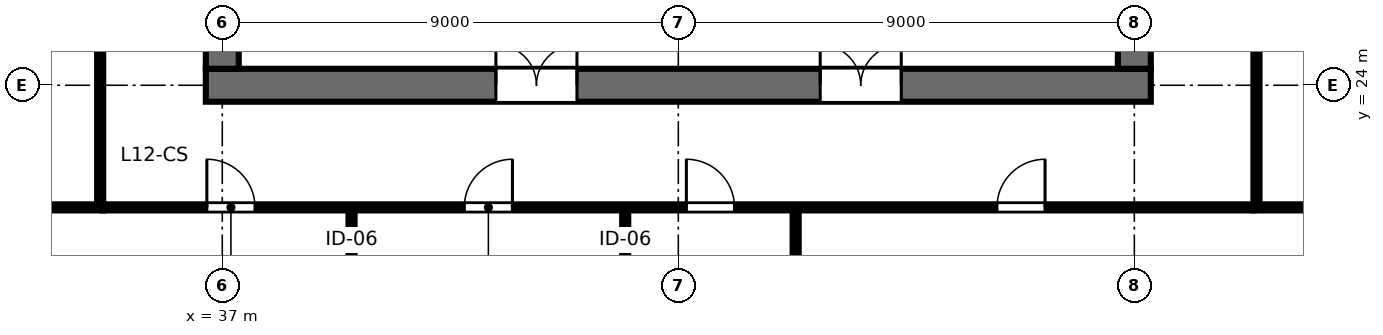
"""IFC4 building model, lengths in metres.
Left out: names, types, materials, properties, quantities, classifications, styles, units other than length and angle.
Written with IfcOpenShell. Run it as: python <this file> out.ifc"""

import sys

from ifc_helpers import new_model, si_unit, direction, frame, frame_2d, origin, place, context, subcontext, project, spatial, rectangle, extrude, element, fill, save


model = new_model("IFC4")
c1 = context("Model", 3, precision=1e-05, world=origin(), true_north=direction((0.0, 1.0)))
c2 = subcontext(c1, "Body", "Model", "MODEL_VIEW")
j1 = project(units=[si_unit("LENGTHUNIT", "METRE"), si_unit("PLANEANGLEUNIT", "RADIAN")], contexts=[c1])
p1 = place(None, origin())
s1 = spatial("IfcSite", under=j1, at=p1, CompositionType="ELEMENT")
p2 = place(p1, origin())
s2 = spatial("IfcBuilding", under=s1, at=p2, CompositionType="ELEMENT")
p3 = place(p2, frame((0.0, 0.0, 49.6)))
s3 = spatial("IfcBuildingStorey", under=s2, at=p3, CompositionType="ELEMENT", Elevation=49.6)
p4 = place(p3, frame((36.675, 24.0, 0.0), z_axis=(0.0, 0.0, 1.0), x_axis=(1.0, 0.0, 0.0)))
e1 = element("IfcWall", 1, at=p4, inside=s3, PredefinedType="SHEAR", context=c2, shape_type="SweptSolid", body=[
    extrude(rectangle(XDim=18.65, YDim=0.65, at=frame_2d((9.325, 0.0))), origin(), (0.0, 0.0, 1.0), 3.36),
])
p5 = place(p4, frame((5.725, 0.0, 0.0)))
e2 = element("IfcOpeningElement", 2, at=p5, cuts=e1, PredefinedType="OPENING", context=c2, shape_type="SweptSolid", body=[
    extrude(rectangle(XDim=1.6, YDim=2.15, at=frame_2d((0.8, 1.075))), frame((0.0, 0.335, 0.0), z_axis=(0.0, -1.0, 0.0), x_axis=(1.0, 0.0, 0.0)), (0.0, 0.0, 1.0), 0.67),
])
p6 = place(p4, frame((12.125, 0.0, 0.0)))
e3 = element("IfcOpeningElement", 3, at=p6, cuts=e1, PredefinedType="OPENING", context=c2, shape_type="SweptSolid", body=[
    extrude(rectangle(XDim=1.6, YDim=2.15, at=frame_2d((0.8, 1.075))), frame((0.0, 0.335, 0.0), z_axis=(0.0, -1.0, 0.0), x_axis=(1.0, 0.0, 0.0)), (0.0, 0.0, 1.0), 0.67),
])
p7 = place(p3, frame((37.0, 24.325, 0.0), z_axis=(0.0, 0.0, 1.0), x_axis=(0.0, 1.0, 0.0)))
e4 = element("IfcWall", 4, at=p7, inside=s3, PredefinedType="SHEAR", context=c2, shape_type="SweptSolid", body=[
    extrude(rectangle(XDim=15.35, YDim=0.65, at=frame_2d((7.675, 0.0))), origin(), (0.0, 0.0, 1.0), 3.36),
])
p8 = place(p7, frame((5.2, 0.0, 0.0)))
e5 = element("IfcOpeningElement", 5, at=p8, cuts=e4, PredefinedType="OPENING", context=c2, shape_type="SweptSolid", body=[
    extrude(rectangle(XDim=1.15, YDim=2.15, at=frame_2d((0.575, 1.075))), frame((0.0, 0.335, 0.0), z_axis=(0.0, -1.0, 0.0), x_axis=(1.0, 0.0, 0.0)), (0.0, 0.0, 1.0), 0.67),
])
p9 = place(p3, frame((55.0, 24.325, 0.0), z_axis=(0.0, 0.0, 1.0), x_axis=(0.0, 1.0, 0.0)))
e6 = element("IfcWall", 6, at=p9, inside=s3, PredefinedType="SHEAR", context=c2, shape_type="SweptSolid", body=[
    extrude(rectangle(XDim=15.35, YDim=0.65, at=frame_2d((7.675, 0.0))), origin(), (0.0, 0.0, 1.0), 3.36),
])
p10 = place(p9, frame((5.2, 0.0, 0.0)))
e7 = element("IfcOpeningElement", 7, at=p10, cuts=e6, PredefinedType="OPENING", context=c2, shape_type="SweptSolid", body=[
    extrude(rectangle(XDim=1.15, YDim=2.15, at=frame_2d((0.575, 1.075))), frame((0.0, 0.335, 0.0), z_axis=(0.0, -1.0, 0.0), x_axis=(1.0, 0.0, 0.0)), (0.0, 0.0, 1.0), 0.67),
])
p11 = place(p3, frame((39.551, 21.59, 0.0), z_axis=(0.0, 0.0, 1.0), x_axis=(0.0, -1.0, 0.0)))
e8 = element("IfcWall", 8, at=p11, inside=s3, PredefinedType="PARTITIONING", context=c2, shape_type="SweptSolid", body=[
    extrude(rectangle(XDim=10.81, YDim=0.12, at=frame_2d((5.405, 0.0))), origin(), (0.0, 0.0, 1.0), 2.64),
])
p12 = place(p11, frame((1.4, 0.0, 0.0)))
e9 = element("IfcOpeningElement", 9, at=p12, cuts=e8, PredefinedType="OPENING", context=c2, shape_type="SweptSolid", body=[
    extrude(rectangle(XDim=0.9, YDim=2.15, at=frame_2d((0.45, 1.075))), frame((0.0, 0.07, 0.0), z_axis=(0.0, -1.0, 0.0), x_axis=(1.0, 0.0, 0.0)), (0.0, 0.0, 1.0), 0.14),
])
p13 = place(p3, frame((44.952, 21.59, 0.0), z_axis=(0.0, 0.0, 1.0), x_axis=(0.0, -1.0, 0.0)))
e10 = element("IfcWall", 10, at=p13, inside=s3, PredefinedType="PARTITIONING", context=c2, shape_type="SweptSolid", body=[
    extrude(rectangle(XDim=10.81, YDim=0.12, at=frame_2d((5.405, 0.0))), origin(), (0.0, 0.0, 1.0), 2.64),
])
p14 = place(p13, frame((1.4, 0.0, 0.0)))
e11 = element("IfcOpeningElement", 11, at=p14, cuts=e10, PredefinedType="OPENING", context=c2, shape_type="SweptSolid", body=[
    extrude(rectangle(XDim=0.9, YDim=2.15, at=frame_2d((0.45, 1.075))), frame((0.0, 0.07, 0.0), z_axis=(0.0, -1.0, 0.0), x_axis=(1.0, 0.0, 0.0)), (0.0, 0.0, 1.0), 0.14),
])
p15 = place(p3, frame((48.316, 21.59, 0.0), z_axis=(0.0, 0.0, 1.0), x_axis=(0.0, -1.0, 0.0)))
e12 = element("IfcWall", 12, at=p15, inside=s3, PredefinedType="PARTITIONING", context=c2, shape_type="SweptSolid", body=[
    extrude(rectangle(XDim=10.81, YDim=0.12, at=frame_2d((5.405, 0.0))), origin(), (0.0, 0.0, 1.0), 2.64),
])
p16 = place(p15, frame((1.4, 0.0, 0.0)))
e13 = element("IfcOpeningElement", 13, at=p16, cuts=e12, PredefinedType="OPENING", context=c2, shape_type="SweptSolid", body=[
    extrude(rectangle(XDim=0.9, YDim=2.15, at=frame_2d((0.45, 1.075))), frame((0.0, 0.07, 0.0), z_axis=(0.0, -1.0, 0.0), x_axis=(1.0, 0.0, 0.0)), (0.0, 0.0, 1.0), 0.14),
])
p17 = place(p3, frame((34.65, 21.59, 0.0), z_axis=(0.0, 0.0, 1.0), x_axis=(1.0, 0.0, 0.0)))
e14 = element("IfcWall", 14, at=p17, inside=s3, PredefinedType="PARTITIONING", context=c2, shape_type="SweptSolid", body=[
    extrude(rectangle(XDim=22.7, YDim=0.12, at=frame_2d((11.35, 0.0))), origin(), (0.0, 0.0, 1.0), 2.64),
])
p18 = place(p17, frame((2.045, 0.0, 0.0)))
e15 = element("IfcOpeningElement", 15, at=p18, cuts=e14, PredefinedType="OPENING", context=c2, shape_type="SweptSolid", body=[
    extrude(rectangle(XDim=0.95, YDim=2.15, at=frame_2d((0.475, 1.075))), frame((0.0, 0.07, 0.0), z_axis=(0.0, -1.0, 0.0), x_axis=(1.0, 0.0, 0.0)), (0.0, 0.0, 1.0), 0.14),
])
p19 = place(p17, frame((7.126, 0.0, 0.0)))
e16 = element("IfcOpeningElement", 16, at=p19, cuts=e14, PredefinedType="OPENING", context=c2, shape_type="SweptSolid", body=[
    extrude(rectangle(XDim=0.95, YDim=2.15, at=frame_2d((0.475, 1.075))), frame((0.0, 0.07, 0.0), z_axis=(0.0, -1.0, 0.0), x_axis=(1.0, 0.0, 0.0)), (0.0, 0.0, 1.0), 0.14),
])
p20 = place(p17, frame((11.509, 0.0, 0.0)))
e17 = element("IfcOpeningElement", 17, at=p20, cuts=e14, PredefinedType="OPENING", context=c2, shape_type="SweptSolid", body=[
    extrude(rectangle(XDim=0.95, YDim=2.15, at=frame_2d((0.475, 1.075))), frame((0.0, 0.07, 0.0), z_axis=(0.0, -1.0, 0.0), x_axis=(1.0, 0.0, 0.0)), (0.0, 0.0, 1.0), 0.14),
])
p21 = place(p17, frame((17.638, 0.0, 0.0)))
e18 = element("IfcOpeningElement", 18, at=p21, cuts=e14, PredefinedType="OPENING", context=c2, shape_type="SweptSolid", body=[
    extrude(rectangle(XDim=0.95, YDim=2.15, at=frame_2d((0.475, 1.075))), frame((0.0, 0.07, 0.0), z_axis=(0.0, -1.0, 0.0), x_axis=(1.0, 0.0, 0.0)), (0.0, 0.0, 1.0), 0.14),
])
p22 = place(p3, frame((34.59, 21.65, 0.0), z_axis=(0.0, 0.0, 1.0), x_axis=(0.0, 1.0, 0.0)))
e19 = element("IfcWall", 19, at=p22, inside=s3, PredefinedType="PARTITIONING", context=c2, shape_type="SweptSolid", body=[
    extrude(rectangle(XDim=20.7, YDim=0.12, at=frame_2d((10.35, 0.0))), origin(), (0.0, 0.0, 1.0), 2.64),
])
p23 = place(p22, frame((9.875, 0.0, 0.0)))
e20 = element("IfcOpeningElement", 20, at=p23, cuts=e19, PredefinedType="OPENING", context=c2, shape_type="SweptSolid", body=[
    extrude(rectangle(XDim=0.95, YDim=2.15, at=frame_2d((0.475, 1.075))), frame((0.0, 0.07, 0.0), z_axis=(0.0, -1.0, 0.0), x_axis=(1.0, 0.0, 0.0)), (0.0, 0.0, 1.0), 0.14),
])
p24 = place(p3, frame((57.41, 21.65, 0.0), z_axis=(0.0, 0.0, 1.0), x_axis=(0.0, 1.0, 0.0)))
e21 = element("IfcWall", 21, at=p24, inside=s3, PredefinedType="PARTITIONING", context=c2, shape_type="SweptSolid", body=[
    extrude(rectangle(XDim=20.7, YDim=0.12, at=frame_2d((10.35, 0.0))), origin(), (0.0, 0.0, 1.0), 2.64),
])
p25 = place(p24, frame((5.479, 0.0, 0.0)))
e22 = element("IfcOpeningElement", 22, at=p25, cuts=e21, PredefinedType="OPENING", context=c2, shape_type="SweptSolid", body=[
    extrude(rectangle(XDim=0.95, YDim=2.15, at=frame_2d((0.475, 1.075))), frame((0.0, 0.07, 0.0), z_axis=(0.0, -1.0, 0.0), x_axis=(1.0, 0.0, 0.0)), (0.0, 0.0, 1.0), 0.14),
])
p26 = place(p24, frame((15.629, 0.0, 0.0)))
e23 = element("IfcOpeningElement", 23, at=p26, cuts=e21, PredefinedType="OPENING", context=c2, shape_type="SweptSolid", body=[
    extrude(rectangle(XDim=0.95, YDim=2.15, at=frame_2d((0.475, 1.075))), frame((0.0, 0.07, 0.0), z_axis=(0.0, -1.0, 0.0), x_axis=(1.0, 0.0, 0.0)), (0.0, 0.0, 1.0), 0.14),
])
for number, where, z_axis, x_axis in (
    (24, (34.65, 21.59, 0.0), (0.0, 0.0, 1.0), (-1.0, 0.0, 0.0)),
    (25, (57.35, 21.59, 0.0), (0.0, 0.0, 1.0), (1.0, 0.0, 0.0)),
):
    element("IfcWall", number, at=place(p3, frame(where, z_axis=z_axis, x_axis=x_axis)), inside=s3, PredefinedType="PARTITIONING", context=c2, shape_type="SweptSolid", body=[
        extrude(rectangle(XDim=12.77, YDim=0.12, at=frame_2d((6.385, 0.0))), origin(), (0.0, 0.0, 1.0), 2.64),
    ])
p27 = place(p5, origin())
e26 = element("IfcDoor", 26, at=p27, inside=s3, OperationType="DOUBLE_DOOR_SINGLE_SWING", PredefinedType="DOOR", context=c2, shape_type="SweptSolid", body=[
    extrude(rectangle(XDim=1.6, YDim=2.15, at=frame_2d((0.8, 1.075))), frame((0.0, 0.025, 0.0), z_axis=(0.0, -1.0, 0.0), x_axis=(1.0, 0.0, 0.0)), (0.0, 0.0, 1.0), 0.05),
])
fill(e2, e26)
p28 = place(p6, origin())
e27 = element("IfcDoor", 27, at=p28, inside=s3, OperationType="DOUBLE_DOOR_SINGLE_SWING", PredefinedType="DOOR", context=c2, shape_type="SweptSolid", body=[
    extrude(rectangle(XDim=1.6, YDim=2.15, at=frame_2d((0.8, 1.075))), frame((0.0, 0.025, 0.0), z_axis=(0.0, -1.0, 0.0), x_axis=(1.0, 0.0, 0.0)), (0.0, 0.0, 1.0), 0.05),
])
fill(e3, e27)
p29 = place(p18, origin())
e28 = element("IfcDoor", 28, at=p29, inside=s3, OperationType="SINGLE_SWING_LEFT", PredefinedType="DOOR", context=c2, shape_type="SweptSolid", body=[
    extrude(rectangle(XDim=0.95, YDim=2.15, at=frame_2d((0.475, 1.075))), frame((0.0, 0.025, 0.0), z_axis=(0.0, -1.0, 0.0), x_axis=(1.0, 0.0, 0.0)), (0.0, 0.0, 1.0), 0.05),
])
fill(e15, e28)
p30 = place(p19, origin())
e29 = element("IfcDoor", 29, at=p30, inside=s3, OperationType="SINGLE_SWING_RIGHT", PredefinedType="DOOR", context=c2, shape_type="SweptSolid", body=[
    extrude(rectangle(XDim=0.95, YDim=2.15, at=frame_2d((0.475, 1.075))), frame((0.0, 0.025, 0.0), z_axis=(0.0, -1.0, 0.0), x_axis=(1.0, 0.0, 0.0)), (0.0, 0.0, 1.0), 0.05),
])
fill(e16, e29)
p31 = place(p20, origin())
e30 = element("IfcDoor", 30, at=p31, inside=s3, OperationType="SINGLE_SWING_LEFT", PredefinedType="DOOR", context=c2, shape_type="SweptSolid", body=[
    extrude(rectangle(XDim=0.95, YDim=2.15, at=frame_2d((0.475, 1.075))), frame((0.0, 0.025, 0.0), z_axis=(0.0, -1.0, 0.0), x_axis=(1.0, 0.0, 0.0)), (0.0, 0.0, 1.0), 0.05),
])
fill(e17, e30)
p32 = place(p21, origin())
e31 = element("IfcDoor", 31, at=p32, inside=s3, OperationType="SINGLE_SWING_RIGHT", PredefinedType="DOOR", context=c2, shape_type="SweptSolid", body=[
    extrude(rectangle(XDim=0.95, YDim=2.15, at=frame_2d((0.475, 1.075))), frame((0.0, 0.025, 0.0), z_axis=(0.0, -1.0, 0.0), x_axis=(1.0, 0.0, 0.0)), (0.0, 0.0, 1.0), 0.05),
])
fill(e18, e31)
save(model, sys.argv[1])
